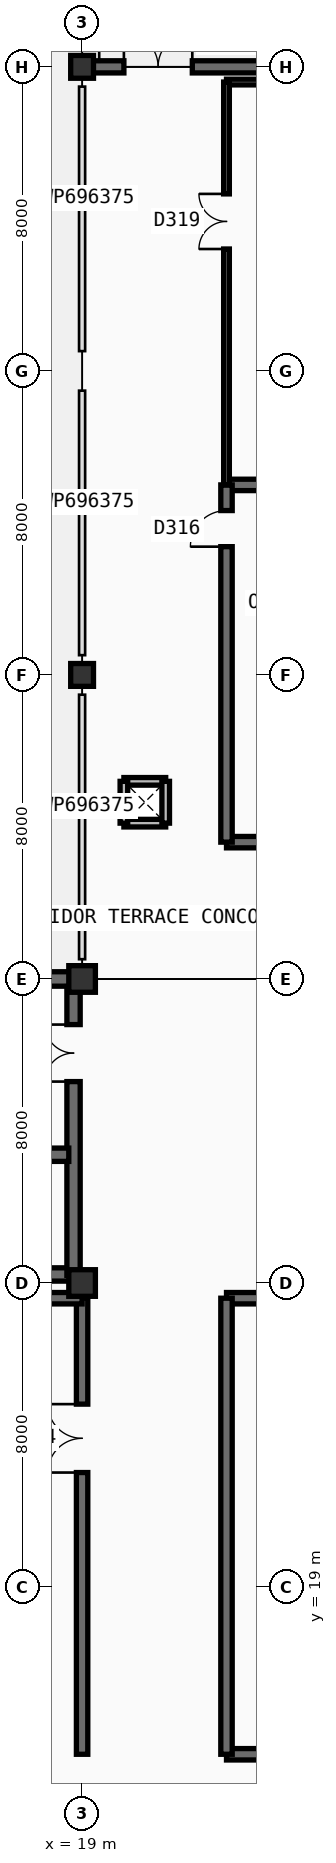
"""IFC4 building model, lengths in metres.
Left out: names, types, materials, properties, quantities, classifications, styles, units other than length and angle.
Written with IfcOpenShell. Run it as: python <this file> out.ifc"""

import sys

from ifc_helpers import new_model, si_unit, direction, frame, frame_2d, origin, origin_2d, place, context, subcontext, project, spatial, rectangle, extrude, element, fill, save


model = new_model("IFC4")
c1 = context("Model", 3, precision=1e-05, world=origin(), true_north=direction((0.0, 1.0)))
c2 = subcontext(c1, "Body", "Model", "MODEL_VIEW")
j1 = project(units=[si_unit("LENGTHUNIT", "METRE"), si_unit("PLANEANGLEUNIT", "RADIAN")], contexts=[c1])
p1 = place(None, origin())
s1 = spatial("IfcSite", under=j1, at=p1, CompositionType="ELEMENT")
p2 = place(p1, origin())
s2 = spatial("IfcBuilding", under=s1, at=p2, CompositionType="ELEMENT")
p3 = place(p2, frame((0.0, 0.0, 23.4)))
s3 = spatial("IfcBuildingStorey", under=s2, at=p3, CompositionType="ELEMENT", Elevation=23.4)
for number, where, z_axis, x_axis in (
    (1, (19.0, 27.0, 0.0), (0.0, 0.0, 1.0), (1.0, 0.0, 0.0)),
    (2, (19.0, 35.0, 0.0), (0.0, 0.0, 1.0), (1.0, 0.0, 0.0)),
):
    element("IfcColumn", number, at=place(p3, frame(where, z_axis=z_axis, x_axis=x_axis)), inside=s3, PredefinedType="COLUMN", context=c2, shape_type="SweptSolid", body=[
        extrude(rectangle(XDim=0.7, YDim=0.7, at=origin_2d()), origin(), (0.0, 0.0, 1.0), 4.5),
    ])
for number, where, z_axis, x_axis in (
    (3, (19.0, 43.0, 0.0), (0.0, 0.0, 1.0), (1.0, 0.0, 0.0)),
    (4, (19.0, 59.0, 0.0), (0.0, 0.0, 1.0), (1.0, 0.0, 0.0)),
):
    element("IfcColumn", number, at=place(p3, frame(where, z_axis=z_axis, x_axis=x_axis)), inside=s3, PredefinedType="COLUMN", context=c2, shape_type="SweptSolid", body=[
        extrude(rectangle(XDim=0.6, YDim=0.6, at=origin_2d()), origin(), (0.0, 0.0, 1.0), 4.5),
    ])
p4 = place(p3, frame((11.0, 35.0, 0.0), z_axis=(0.0, 0.0, 1.0), x_axis=(1.0, 0.0, 0.0)))
e5 = element("IfcWall", 5, at=p4, inside=s3, PredefinedType="SOLIDWALL", context=c2, shape_type="SweptSolid", body=[
    extrude(rectangle(XDim=8.0, YDim=0.38, at=frame_2d((4.0, 0.0))), origin(), (0.0, 0.0, 1.0), 4.5),
])
p5 = place(p3, frame((19.0, 59.0, 0.0), z_axis=(0.0, 0.0, 1.0), x_axis=(1.0, 0.0, 0.0)))
e6 = element("IfcWall", 6, at=p5, inside=s3, PredefinedType="SOLIDWALL", context=c2, shape_type="SweptSolid", body=[
    extrude(rectangle(XDim=8.0, YDim=0.32, at=frame_2d((4.0, 0.0))), origin(), (0.0, 0.0, 1.0), 4.5),
])
p6 = place(p5, frame((1.1, 0.0, 0.0)))
e7 = element("IfcOpeningElement", 7, at=p6, cuts=e6, PredefinedType="OPENING", context=c2, shape_type="SweptSolid", body=[
    extrude(rectangle(XDim=1.8, YDim=2.3, at=frame_2d((0.9, 1.15))), frame((0.0, 0.17, 0.0), z_axis=(0.0, -1.0, 0.0), x_axis=(1.0, 0.0, 0.0)), (0.0, 0.0, 1.0), 0.34),
])
p7 = place(p3, frame((3.2, 27.225, 0.0), z_axis=(0.0, 0.0, 1.0), x_axis=(1.0, 0.0, 0.0)))
e8 = element("IfcWall", 8, at=p7, inside=s3, PredefinedType="SHEAR", context=c2, shape_type="SweptSolid", body=[
    extrude(rectangle(XDim=15.6, YDim=0.35, at=frame_2d((7.8, 0.0))), origin(), (0.0, 0.0, 1.0), 4.1),
])
p8 = place(p3, frame((18.775, 27.2, 0.0), z_axis=(0.0, 0.0, 1.0), x_axis=(0.0, 1.0, 0.0)))
e9 = element("IfcWall", 9, at=p8, inside=s3, PredefinedType="SHEAR", context=c2, shape_type="SweptSolid", body=[
    extrude(rectangle(XDim=7.6, YDim=0.35, at=frame_2d((3.8, 0.0))), origin(), (0.0, 0.0, 1.0), 4.1),
])
p9 = place(p8, frame((5.1, 0.0, 0.0)))
e10 = element("IfcOpeningElement", 10, at=p9, cuts=e9, PredefinedType="OPENING", context=c2, shape_type="SweptSolid", body=[
    extrude(rectangle(XDim=1.5, YDim=2.2, at=frame_2d((0.75, 1.1))), frame((0.0, 0.185, 0.0), z_axis=(0.0, -1.0, 0.0), x_axis=(1.0, 0.0, 0.0)), (0.0, 0.0, 1.0), 0.37),
])
p10 = place(p3, frame((13.175, 30.375, 0.0), z_axis=(0.0, 0.0, 1.0), x_axis=(1.0, 0.0, 0.0)))
e11 = element("IfcWall", 11, at=p10, inside=s3, PredefinedType="SHEAR", context=c2, shape_type="SweptSolid", body=[
    extrude(rectangle(XDim=5.475, YDim=0.35, at=frame_2d((2.737, 0.0))), origin(), (0.0, 0.0, 1.0), 4.1),
])
p11 = place(p10, frame((0.7, 0.0, 0.0)))
e12 = element("IfcOpeningElement", 12, at=p11, cuts=e11, PredefinedType="OPENING", context=c2, shape_type="SweptSolid", body=[
    extrude(rectangle(XDim=1.25, YDim=2.25, at=frame_2d((0.625, 1.125))), frame((0.0, 0.185, 0.0), z_axis=(0.0, -1.0, 0.0), x_axis=(1.0, 0.0, 0.0)), (0.0, 0.0, 1.0), 0.37),
])
p12 = place(p10, frame((3.475, 0.0, 0.0)))
e13 = element("IfcOpeningElement", 13, at=p12, cuts=e11, PredefinedType="OPENING", context=c2, shape_type="SweptSolid", body=[
    extrude(rectangle(XDim=1.1, YDim=2.2, at=frame_2d((0.55, 1.1))), frame((0.0, 0.185, 0.0), z_axis=(0.0, -1.0, 0.0), x_axis=(1.0, 0.0, 0.0)), (0.0, 0.0, 1.0), 0.37),
])
p13 = place(p3, frame((19.0, 14.6, 0.0), z_axis=(0.0, 0.0, 1.0), x_axis=(0.0, 1.0, 0.0)))
e14 = element("IfcWall", 14, at=p13, inside=s3, PredefinedType="SHEAR", context=c2, shape_type="SweptSolid", body=[
    extrude(rectangle(XDim=12.0, YDim=0.3, at=frame_2d((6.0, 0.0))), origin(), (0.0, 0.0, 1.0), 4.1),
])
p14 = place(p13, frame((7.413, 0.0, 0.0)))
e15 = element("IfcOpeningElement", 15, at=p14, cuts=e14, PredefinedType="OPENING", context=c2, shape_type="SweptSolid", body=[
    extrude(rectangle(XDim=1.8, YDim=2.3, at=frame_2d((0.9, 1.15))), frame((0.0, 0.16, 0.0), z_axis=(0.0, -1.0, 0.0), x_axis=(1.0, 0.0, 0.0)), (0.0, 0.0, 1.0), 0.32),
])
p15 = place(p3, frame((3.4, 26.6, 0.0), z_axis=(0.0, 0.0, 1.0), x_axis=(1.0, 0.0, 0.0)))
e16 = element("IfcWall", 16, at=p15, inside=s3, PredefinedType="SHEAR", context=c2, shape_type="SweptSolid", body=[
    extrude(rectangle(XDim=15.6, YDim=0.3, at=frame_2d((7.8, 0.0))), origin(), (0.0, 0.0, 1.0), 4.1),
])
p16 = place(p3, frame((22.8, 14.6, 0.0), z_axis=(0.0, 0.0, 1.0), x_axis=(1.0, 0.0, 0.0)))
e17 = element("IfcWall", 17, at=p16, inside=s3, PredefinedType="SHEAR", context=c2, shape_type="SweptSolid", body=[
    extrude(rectangle(XDim=19.8, YDim=0.3, at=frame_2d((9.9, 0.0))), origin(), (0.0, 0.0, 1.0), 4.1),
])
p17 = place(p16, frame((7.26, 0.0, 0.0)))
e18 = element("IfcOpeningElement", 18, at=p17, cuts=e17, PredefinedType="OPENING", context=c2, shape_type="SweptSolid", body=[
    extrude(rectangle(XDim=1.85, YDim=2.25, at=frame_2d((0.925, 1.125))), frame((0.0, 0.16, 0.0), z_axis=(0.0, -1.0, 0.0), x_axis=(1.0, 0.0, 0.0)), (0.0, 0.0, 1.0), 0.32),
])
p18 = place(p3, frame((22.8, 26.6, 0.0), z_axis=(0.0, 0.0, 1.0), x_axis=(1.0, 0.0, 0.0)))
e19 = element("IfcWall", 19, at=p18, inside=s3, PredefinedType="SHEAR", context=c2, shape_type="SweptSolid", body=[
    extrude(rectangle(XDim=19.8, YDim=0.3, at=frame_2d((9.9, 0.0))), origin(), (0.0, 0.0, 1.0), 4.1),
])
p19 = place(p3, frame((22.8, 14.6, 0.0), z_axis=(0.0, 0.0, 1.0), x_axis=(0.0, 1.0, 0.0)))
e20 = element("IfcWall", 20, at=p19, inside=s3, PredefinedType="SHEAR", context=c2, shape_type="SweptSolid", body=[
    extrude(rectangle(XDim=12.0, YDim=0.3, at=frame_2d((6.0, 0.0))), origin(), (0.0, 0.0, 1.0), 4.1),
])
for number, where, z_axis, x_axis in (
    (21, (22.8, 38.6, 0.0), (0.0, 0.0, 1.0), (1.0, 0.0, 0.0)),
    (22, (22.8, 48.0, 0.0), (0.0, 0.0, 1.0), (1.0, 0.0, 0.0)),
):
    element("IfcWall", number, at=place(p3, frame(where, z_axis=z_axis, x_axis=x_axis)), inside=s3, PredefinedType="SHEAR", context=c2, shape_type="SweptSolid", body=[
        extrude(rectangle(XDim=10.6, YDim=0.3, at=frame_2d((5.3, 0.0))), origin(), (0.0, 0.0, 1.0), 4.1),
    ])
p20 = place(p3, frame((22.8, 38.6, 0.0), z_axis=(0.0, 0.0, 1.0), x_axis=(0.0, 1.0, 0.0)))
e23 = element("IfcWall", 23, at=p20, inside=s3, PredefinedType="SHEAR", context=c2, shape_type="SweptSolid", body=[
    extrude(rectangle(XDim=9.4, YDim=0.3, at=frame_2d((4.7, 0.0))), origin(), (0.0, 0.0, 1.0), 4.1),
])
p21 = place(p20, frame((7.775, 0.0, 0.0)))
e24 = element("IfcOpeningElement", 24, at=p21, cuts=e23, PredefinedType="OPENING", context=c2, shape_type="SweptSolid", body=[
    extrude(rectangle(XDim=0.95, YDim=2.1, at=frame_2d((0.475, 1.05))), frame((0.0, 0.16, 0.0), z_axis=(0.0, -1.0, 0.0), x_axis=(1.0, 0.0, 0.0)), (0.0, 0.0, 1.0), 0.32),
])
p22 = place(p3, frame((22.8, 58.6, 0.0), z_axis=(0.0, 0.0, 1.0), x_axis=(1.0, 0.0, 0.0)))
e25 = element("IfcWall", 25, at=p22, inside=s3, PredefinedType="PARTITIONING", context=c2, shape_type="SweptSolid", body=[
    extrude(rectangle(XDim=19.8, YDim=0.15, at=frame_2d((9.9, 0.0))), origin(), (0.0, 0.0, 1.0), 3.505),
])
p23 = place(p3, frame((22.8, 48.0, 0.0), z_axis=(0.0, 0.0, 1.0), x_axis=(0.0, 1.0, 0.0)))
e26 = element("IfcWall", 26, at=p23, inside=s3, PredefinedType="PARTITIONING", context=c2, shape_type="SweptSolid", body=[
    extrude(rectangle(XDim=10.6, YDim=0.15, at=frame_2d((5.3, 0.0))), origin(), (0.0, 0.0, 1.0), 4.1),
])
p24 = place(p23, frame((6.207, 0.0, 0.0)))
e27 = element("IfcOpeningElement", 27, at=p24, cuts=e26, PredefinedType="OPENING", context=c2, shape_type="SweptSolid", body=[
    extrude(rectangle(XDim=1.45, YDim=2.25, at=frame_2d((0.725, 1.125))), frame((0.0, 0.085, 0.0), z_axis=(0.0, -1.0, 0.0), x_axis=(1.0, 0.0, 0.0)), (0.0, 0.0, 1.0), 0.17),
])
for number, where, z_axis, x_axis in (
    (28, (20.1, 39.1, 0.0), (0.0, 0.0, 1.0), (1.0, 0.0, 0.0)),
    (29, (20.1, 40.2, 0.0), (0.0, 0.0, 1.0), (1.0, 0.0, 0.0)),
    (30, (20.1, 39.1, 0.0), (0.0, 0.0, 1.0), (0.0, 1.0, 0.0)),
    (31, (21.2, 39.1, 0.0), (0.0, 0.0, 1.0), (0.0, 1.0, 0.0)),
):
    element("IfcWall", number, at=place(p3, frame(where, z_axis=z_axis, x_axis=x_axis)), inside=s3, PredefinedType="PARTITIONING", context=c2, shape_type="SweptSolid", body=[
        extrude(rectangle(XDim=1.1, YDim=0.2, at=frame_2d((0.55, 0.0))), origin(), (0.0, 0.0, 1.0), 4.1),
    ])
p25 = place(p6, origin())
e32 = element("IfcDoor", 32, at=p25, inside=s3, OperationType="DOUBLE_DOOR_SINGLE_SWING", PredefinedType="DOOR", context=c2, shape_type="SweptSolid", body=[
    extrude(rectangle(XDim=1.8, YDim=2.3, at=frame_2d((0.9, 1.15))), frame((0.0, 0.025, 0.0), z_axis=(0.0, -1.0, 0.0), x_axis=(1.0, 0.0, 0.0)), (0.0, 0.0, 1.0), 0.05),
])
fill(e7, e32)
p26 = place(p9, origin())
e33 = element("IfcDoor", 33, at=p26, inside=s3, OperationType="DOUBLE_DOOR_SINGLE_SWING", PredefinedType="DOOR", context=c2, shape_type="SweptSolid", body=[
    extrude(rectangle(XDim=1.5, YDim=2.2, at=frame_2d((0.75, 1.1))), frame((0.0, 0.025, 0.0), z_axis=(0.0, -1.0, 0.0), x_axis=(1.0, 0.0, 0.0)), (0.0, 0.0, 1.0), 0.05),
])
fill(e10, e33)
p27 = place(p14, origin())
e34 = element("IfcDoor", 34, at=p27, inside=s3, OperationType="DOUBLE_DOOR_SINGLE_SWING", PredefinedType="DOOR", context=c2, shape_type="SweptSolid", body=[
    extrude(rectangle(XDim=1.8, YDim=2.3, at=frame_2d((0.9, 1.15))), frame((0.0, 0.025, 0.0), z_axis=(0.0, -1.0, 0.0), x_axis=(1.0, 0.0, 0.0)), (0.0, 0.0, 1.0), 0.05),
])
fill(e15, e34)
p28 = place(p21, origin())
e35 = element("IfcDoor", 35, at=p28, inside=s3, OperationType="SINGLE_SWING_LEFT", PredefinedType="DOOR", context=c2, shape_type="SweptSolid", body=[
    extrude(rectangle(XDim=0.95, YDim=2.1, at=frame_2d((0.475, 1.05))), frame((0.0, 0.025, 0.0), z_axis=(0.0, -1.0, 0.0), x_axis=(1.0, 0.0, 0.0)), (0.0, 0.0, 1.0), 0.05),
])
fill(e24, e35)
p29 = place(p24, origin())
e36 = element("IfcDoor", 36, at=p29, inside=s3, OperationType="DOUBLE_DOOR_SINGLE_SWING", PredefinedType="DOOR", context=c2, shape_type="SweptSolid", body=[
    extrude(rectangle(XDim=1.45, YDim=2.25, at=frame_2d((0.725, 1.125))), frame((0.0, 0.025, 0.0), z_axis=(0.0, -1.0, 0.0), x_axis=(1.0, 0.0, 0.0)), (0.0, 0.0, 1.0), 0.05),
])
fill(e27, e36)
save(model, sys.argv[1])
